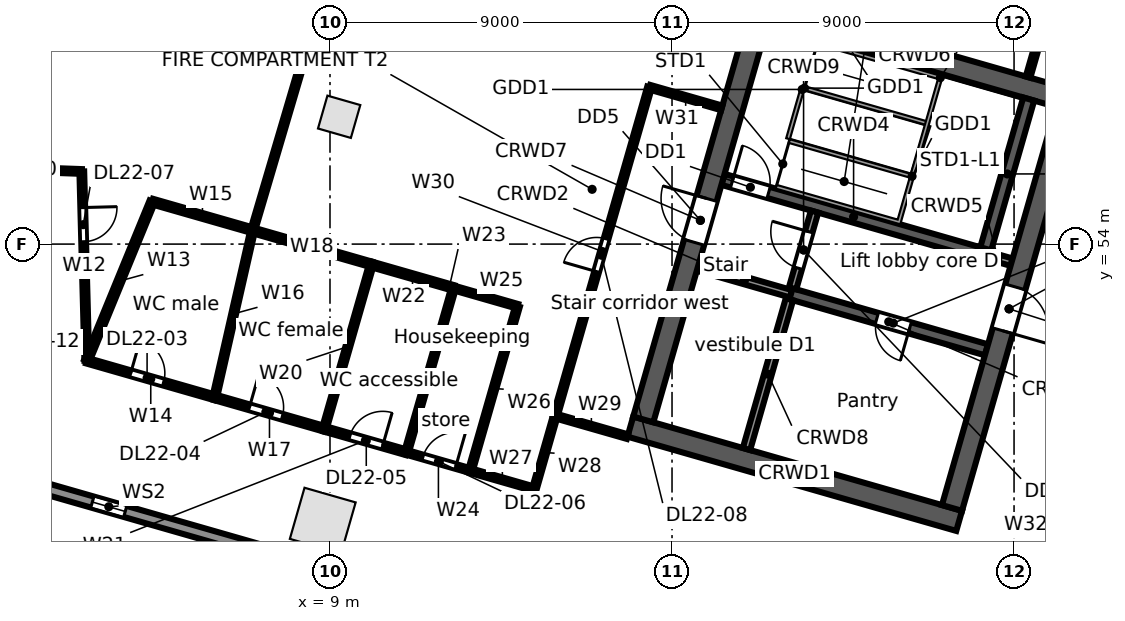
"""IFC4 building model, lengths in metres.
Left out: names, types, materials, properties, quantities, classifications, styles, units other than length and angle.
Written with IfcOpenShell. Run it as: python <this file> out.ifc"""

import sys

from ifc_helpers import new_model, si_unit, direction, frame, frame_2d, origin, origin_2d, place, context, subcontext, project, spatial, rectangle, extrude, element, fill, save


model = new_model("IFC4")
c1 = context("Model", 3, precision=1e-05, world=origin(), true_north=direction((0.0, 1.0)))
c2 = subcontext(c1, "Body", "Model", "MODEL_VIEW")
j1 = project(units=[si_unit("LENGTHUNIT", "METRE"), si_unit("PLANEANGLEUNIT", "RADIAN")], contexts=[c1])
p1 = place(None, origin())
s1 = spatial("IfcSite", under=j1, at=p1, CompositionType="ELEMENT")
p2 = place(p1, origin())
s2 = spatial("IfcBuilding", under=s1, at=p2, CompositionType="ELEMENT")
p3 = place(p2, frame((0.0, 0.0, 110.3)))
s3 = spatial("IfcBuildingStorey", under=s2, at=p3, CompositionType="ELEMENT", Elevation=110.3)
p4 = place(p3, frame((8.81, 46.722, 0.0), z_axis=(0.0, 0.0, 1.0), x_axis=(0.961261695938, -0.275637355817, 0.0)))
e1 = element("IfcColumn", 1, at=p4, inside=s3, PredefinedType="COLUMN", context=c2, shape_type="SweptSolid", body=[
    extrude(rectangle(XDim=1.4, YDim=1.4, at=origin_2d()), origin(), (0.0, 0.0, 1.0), 4.4),
])
p5 = place(p3, frame((9.241, 57.35, 0.0), z_axis=(0.0, 0.0, 1.0), x_axis=(0.961261695938, -0.275637355817, 0.0)))
e2 = element("IfcColumn", 2, at=p5, inside=s3, PredefinedType="COLUMN", context=c2, shape_type="SweptSolid", body=[
    extrude(rectangle(XDim=0.9, YDim=0.9, at=origin_2d()), origin(), (0.0, 0.0, 1.0), 4.4),
])
p6 = place(p3, frame((25.398, 40.717, 0.0), z_axis=(0.0, 0.0, 1.0), x_axis=(-0.961262423262, 0.275634819324, 0.0)))
e3 = element("IfcWall", 3, at=p6, inside=s3, PredefinedType="STANDARD", context=c2, shape_type="SweptSolid", body=[
    extrude(rectangle(XDim=26.359, YDim=0.3, at=frame_2d((13.179, 0.0))), origin(), (0.0, 0.0, 1.0), 4.08),
])
p7 = place(p6, frame((22.664, 0.0, 0.6)))
e4 = element("IfcOpeningElement", 4, at=p7, cuts=e3, PredefinedType="OPENING", context=c2, shape_type="SweptSolid", body=[
    extrude(rectangle(XDim=0.9, YDim=2.8, at=frame_2d((0.45, 1.4))), frame((0.0, 0.16, 0.0), z_axis=(0.0, -1.0, 0.0), x_axis=(1.0, 0.0, 0.0)), (0.0, 0.0, 1.0), 0.32),
])
p8 = place(p6, frame((13.844, 0.0, 0.6)))
e5 = element("IfcOpeningElement", 5, at=p8, cuts=e3, PredefinedType="OPENING", context=c2, shape_type="SweptSolid", body=[
    extrude(rectangle(XDim=0.9, YDim=2.8, at=frame_2d((0.45, 1.4))), frame((0.0, 0.16, 0.0), z_axis=(0.0, -1.0, 0.0), x_axis=(1.0, 0.0, 0.0)), (0.0, 0.0, 1.0), 0.32),
])
p9 = place(p6, frame((5.023, 0.0, 0.6)))
e6 = element("IfcOpeningElement", 6, at=p9, cuts=e3, PredefinedType="OPENING", context=c2, shape_type="SweptSolid", body=[
    extrude(rectangle(XDim=0.9, YDim=2.8, at=frame_2d((0.45, 1.4))), frame((0.0, 0.16, 0.0), z_axis=(0.0, -1.0, 0.0), x_axis=(1.0, 0.0, 0.0)), (0.0, 0.0, 1.0), 0.32),
])
p10 = place(p3, frame((16.904, 49.197, 0.0), z_axis=(0.0, 0.0, 1.0), x_axis=(0.96126248289, -0.275634611374, 0.0)))
e7 = element("IfcWall", 7, at=p10, inside=s3, PredefinedType="SOLIDWALL", context=c2, shape_type="SweptSolid", body=[
    extrude(rectangle(XDim=9.0, YDim=0.55, at=frame_2d((4.5, 0.0))), origin(), (0.0, 0.0, 1.0), 4.08),
])
p11 = place(p3, frame((18.68, 53.396, 0.0), z_axis=(0.0, 0.0, 1.0), x_axis=(0.961234387647, -0.275732573349, 0.0)))
e8 = element("IfcWall", 8, at=p11, inside=s3, PredefinedType="SOLIDWALL", context=c2, shape_type="SweptSolid", body=[
    extrude(rectangle(XDim=2.55, YDim=0.2, at=frame_2d((1.275, 0.0))), origin(), (0.0, 0.0, 1.0), 4.08),
])
p12 = place(p3, frame((21.131, 52.692, 0.0), z_axis=(0.0, 0.0, 1.0), x_axis=(0.961265220997, -0.27562506218, 0.0)))
e9 = element("IfcWall", 9, at=p12, inside=s3, PredefinedType="SOLIDWALL", context=c2, shape_type="SweptSolid", body=[
    extrude(rectangle(XDim=5.35, YDim=0.3, at=frame_2d((2.675, 0.0))), origin(), (0.0, 0.0, 1.0), 4.08),
])
p13 = place(p12, frame((2.35, 0.0, 0.0)))
e10 = element("IfcOpeningElement", 10, at=p13, cuts=e9, PredefinedType="OPENING", context=c2, shape_type="SweptSolid", body=[
    extrude(rectangle(XDim=0.9, YDim=2.1, at=frame_2d((0.45, 1.05))), frame((0.0, 0.16, 0.0), z_axis=(0.0, -1.0, 0.0), x_axis=(1.0, 0.0, 0.0)), (0.0, 0.0, 1.0), 0.32),
])
p14 = place(p3, frame((19.341, 55.702, 0.0), z_axis=(0.0, 0.0, 1.0), x_axis=(0.961263228157, -0.27563201228, 0.0)))
e11 = element("IfcWall", 11, at=p14, inside=s3, PredefinedType="SOLIDWALL", context=c2, shape_type="SweptSolid", body=[
    extrude(rectangle(XDim=7.15, YDim=0.3, at=frame_2d((3.575, 0.0))), origin(), (0.0, 0.0, 1.0), 4.08),
])
p15 = place(p14, frame((0.25, 0.0, 0.0)))
e12 = element("IfcOpeningElement", 12, at=p15, cuts=e11, PredefinedType="OPENING", context=c2, shape_type="SweptSolid", body=[
    extrude(rectangle(XDim=1.0, YDim=2.1, at=frame_2d((0.5, 1.05))), frame((0.0, 0.16, 0.0), z_axis=(0.0, -1.0, 0.0), x_axis=(1.0, 0.0, 0.0)), (0.0, 0.0, 1.0), 0.32),
])
p16 = place(p3, frame((26.214, 53.732, 0.0), z_axis=(0.0, 0.0, 1.0), x_axis=(0.961240918172, -0.275709806194, 0.0)))
e13 = element("IfcWall", 13, at=p16, inside=s3, PredefinedType="SOLIDWALL", context=c2, shape_type="SweptSolid", body=[
    extrude(rectangle(XDim=0.75, YDim=0.2, at=frame_2d((0.375, 0.0))), origin(), (0.0, 0.0, 1.0), 4.08),
])
p17 = place(p3, frame((20.06, 60.204, 0.0), z_axis=(0.0, 0.0, 1.0), x_axis=(0.96126248289, -0.275634611374, 0.0)))
e14 = element("IfcWall", 14, at=p17, inside=s3, PredefinedType="SOLIDWALL", context=c2, shape_type="SweptSolid", body=[
    extrude(rectangle(XDim=9.0, YDim=0.55, at=frame_2d((4.5, 0.0))), origin(), (0.0, 0.0, 1.0), 4.08),
])
p18 = place(p3, frame((17.244, 49.386, 0.0), z_axis=(0.0, 0.0, 1.0), x_axis=(0.275632146085, 0.96126318979, 0.0)))
e15 = element("IfcWall", 15, at=p18, inside=s3, PredefinedType="SOLIDWALL", context=c2, shape_type="SweptSolid", body=[
    extrude(rectangle(XDim=10.9, YDim=0.55, at=frame_2d((5.45, 0.0))), origin(), (0.0, 0.0, 1.0), 4.08),
])
p19 = place(p18, frame((4.85, 0.0, 0.0)))
e16 = element("IfcOpeningElement", 16, at=p19, cuts=e15, PredefinedType="OPENING", context=c2, shape_type="SweptSolid", body=[
    extrude(rectangle(XDim=1.2, YDim=2.1, at=frame_2d((0.6, 1.05))), frame((0.0, 0.285, 0.0), z_axis=(0.0, -1.0, 0.0), x_axis=(1.0, 0.0, 0.0)), (0.0, 0.0, 1.0), 0.57),
])
p20 = place(p3, frame((19.959, 48.607, 0.0), z_axis=(0.0, 0.0, 1.0), x_axis=(0.275641165445, 0.961260603537, 0.0)))
e17 = element("IfcWall", 17, at=p20, inside=s3, PredefinedType="SOLIDWALL", context=c2, shape_type="SweptSolid", body=[
    extrude(rectangle(XDim=4.1, YDim=0.2, at=frame_2d((2.05, 0.0))), origin(), (0.0, 0.0, 1.0), 4.08),
])
p21 = place(p3, frame((21.172, 52.837, 0.0), z_axis=(0.0, 0.0, 1.0), x_axis=(0.275657676022, 0.961255868981, 0.0)))
e18 = element("IfcWall", 18, at=p21, inside=s3, PredefinedType="PARTITIONING", context=c2, shape_type="SweptSolid", body=[
    extrude(rectangle(XDim=2.1, YDim=0.2, at=frame_2d((1.05, 0.0))), origin(), (0.0, 0.0, 1.0), 4.08),
])
p22 = place(p21, frame((0.55, 0.0, 0.0)))
e19 = element("IfcOpeningElement", 19, at=p22, cuts=e18, PredefinedType="OPENING", context=c2, shape_type="SweptSolid", body=[
    extrude(rectangle(XDim=1.0, YDim=2.1, at=frame_2d((0.5, 1.05))), frame((0.0, 0.11, 0.0), z_axis=(0.0, -1.0, 0.0), x_axis=(1.0, 0.0, 0.0)), (0.0, 0.0, 1.0), 0.22),
])
p23 = place(p3, frame((26.256, 53.876, 0.0), z_axis=(0.0, 0.0, 1.0), x_axis=(0.275641165445, 0.961260603537, 0.0)))
e20 = element("IfcWall", 20, at=p23, inside=s3, PredefinedType="SOLIDWALL", context=c2, shape_type="SweptSolid", body=[
    extrude(rectangle(XDim=4.1, YDim=0.3, at=frame_2d((2.05, 0.0))), origin(), (0.0, 0.0, 1.0), 4.08),
])
p24 = place(p3, frame((25.366, 47.057, 0.0), z_axis=(0.0, 0.0, 1.0), x_axis=(0.275632146085, 0.96126318979, 0.0)))
e21 = element("IfcWall", 21, at=p24, inside=s3, PredefinedType="SOLIDWALL", context=c2, shape_type="SweptSolid", body=[
    extrude(rectangle(XDim=10.9, YDim=0.55, at=frame_2d((5.45, 0.0))), origin(), (0.0, 0.0, 1.0), 4.08),
])
p25 = place(p24, frame((4.85, 0.0, 0.0)))
e22 = element("IfcOpeningElement", 22, at=p25, cuts=e21, PredefinedType="OPENING", context=c2, shape_type="SweptSolid", body=[
    extrude(rectangle(XDim=1.2, YDim=2.1, at=frame_2d((0.6, 1.05))), frame((0.0, 0.285, 0.0), z_axis=(0.0, -1.0, 0.0), x_axis=(1.0, 0.0, 0.0)), (0.0, 0.0, 1.0), 0.57),
])
p26 = place(p3, frame((0.0, 56.0, 0.0), z_axis=(0.0, 0.0, 1.0), x_axis=(0.999349313684, -0.036068673934, 0.0)))
e23 = element("IfcWall", 23, at=p26, inside=s3, PredefinedType="PARTITIONING", context=c2, shape_type="SweptSolid", body=[
    extrude(rectangle(XDim=2.471, YDim=0.125, at=frame_2d((1.235, 0.0))), origin(), (0.0, 0.0, 1.0), 4.08),
])
p27 = place(p3, frame((2.469, 55.911, 0.0), z_axis=(0.0, 0.0, 1.0), x_axis=(0.02651808123, -0.999648333849, 0.0)))
e24 = element("IfcWall", 24, at=p27, inside=s3, PredefinedType="PARTITIONING", context=c2, shape_type="SweptSolid", body=[
    extrude(rectangle(XDim=4.981, YDim=0.125, at=frame_2d((2.49, 0.0))), origin(), (0.0, 0.0, 1.0), 4.08),
])
p28 = place(p27, frame((0.95, 0.0, 0.0)))
e25 = element("IfcOpeningElement", 25, at=p28, cuts=e24, PredefinedType="OPENING", context=c2, shape_type="SweptSolid", body=[
    extrude(rectangle(XDim=0.9, YDim=2.1, at=frame_2d((0.45, 1.05))), frame((0.0, 0.073, 0.0), z_axis=(0.0, -1.0, 0.0), x_axis=(1.0, 0.0, 0.0)), (0.0, 0.0, 1.0), 0.145),
])
p29 = place(p3, frame((2.601, 50.932, 0.0), z_axis=(0.0, 0.0, 1.0), x_axis=(0.380066317543, 0.924959239247, 0.0)))
e26 = element("IfcWall", 26, at=p29, inside=s3, PredefinedType="PARTITIONING", context=c2, shape_type="SweptSolid", body=[
    extrude(rectangle(XDim=4.528, YDim=0.15, at=frame_2d((2.264, 0.0))), origin(), (0.0, 0.0, 1.0), 4.08),
])
p30 = place(p3, frame((2.601, 50.932, 0.0), z_axis=(0.0, 0.0, 1.0), x_axis=(0.961265606965, -0.27562371608, 0.0)))
e27 = element("IfcWall", 27, at=p30, inside=s3, PredefinedType="PARTITIONING", context=c2, shape_type="SweptSolid", body=[
    extrude(rectangle(XDim=3.5, YDim=0.15, at=frame_2d((1.75, 0.0))), origin(), (0.0, 0.0, 1.0), 4.08),
])
p31 = place(p30, frame((1.2, 0.0, 0.0)))
e28 = element("IfcOpeningElement", 28, at=p31, cuts=e27, PredefinedType="OPENING", context=c2, shape_type="SweptSolid", body=[
    extrude(rectangle(XDim=0.9, YDim=2.1, at=frame_2d((0.45, 1.05))), frame((0.0, 0.085, 0.0), z_axis=(0.0, -1.0, 0.0), x_axis=(1.0, 0.0, 0.0)), (0.0, 0.0, 1.0), 0.17),
])
p32 = place(p3, frame((4.322, 55.12, 0.0), z_axis=(0.0, 0.0, 1.0), x_axis=(0.961272337704, -0.275600240865, 0.0)))
e29 = element("IfcWall", 29, at=p32, inside=s3, PredefinedType="PARTITIONING", context=c2, shape_type="SweptSolid", body=[
    extrude(rectangle(XDim=2.75, YDim=0.15, at=frame_2d((1.375, 0.0))), origin(), (0.0, 0.0, 1.0), 4.08),
])
p33 = place(p3, frame((5.966, 49.967, 0.0), z_axis=(0.0, 0.0, 1.0), x_axis=(0.221859891223, 0.975078555126, 0.0)))
e30 = element("IfcWall", 30, at=p33, inside=s3, PredefinedType="PARTITIONING", context=c2, shape_type="SweptSolid", body=[
    extrude(rectangle(XDim=4.507, YDim=0.125, at=frame_2d((2.254, 0.0))), origin(), (0.0, 0.0, 1.0), 4.08),
])
p34 = place(p3, frame((5.966, 49.967, 0.0), z_axis=(0.0, 0.0, 1.0), x_axis=(0.961222353496, -0.275774522283, 0.0)))
e31 = element("IfcWall", 31, at=p34, inside=s3, PredefinedType="PARTITIONING", context=c2, shape_type="SweptSolid", body=[
    extrude(rectangle(XDim=2.999, YDim=0.15, at=frame_2d((1.5, 0.0))), origin(), (0.0, 0.0, 1.0), 3.16),
])
p35 = place(p34, frame((0.95, 0.0, 0.0)))
e32 = element("IfcOpeningElement", 32, at=p35, cuts=e31, PredefinedType="OPENING", context=c2, shape_type="SweptSolid", body=[
    extrude(rectangle(XDim=0.9, YDim=2.1, at=frame_2d((0.45, 1.05))), frame((0.0, 0.085, 0.0), z_axis=(0.0, -1.0, 0.0), x_axis=(1.0, 0.0, 0.0)), (0.0, 0.0, 1.0), 0.17),
])
p36 = place(p3, frame((6.966, 54.362, 0.0), z_axis=(0.0, 0.0, 1.0), x_axis=(0.961245650832, -0.275693305607, 0.0)))
e33 = element("IfcWall", 33, at=p36, inside=s3, PredefinedType="PARTITIONING", context=c2, shape_type="SweptSolid", body=[
    extrude(rectangle(XDim=3.25, YDim=0.15, at=frame_2d((1.625, 0.0))), origin(), (0.0, 0.0, 1.0), 3.16),
])
p37 = place(p3, frame((6.966, 54.362, 0.0), z_axis=(0.0, 0.0, 1.0), x_axis=(0.283059793108, 0.959102264373, 0.0)))
e34 = element("IfcWall", 34, at=p37, inside=s3, PredefinedType="PARTITIONING", context=c2, shape_type="SweptSolid", body=[
    extrude(rectangle(XDim=13.135, YDim=0.125, at=frame_2d((6.567, 0.0))), origin(), (0.0, 0.0, 1.0), 3.142),
])
p38 = place(p3, frame((8.849, 49.14, 0.0), z_axis=(0.0, 0.0, 1.0), x_axis=(0.275731175537, 0.961234788612, 0.0)))
e35 = element("IfcWall", 35, at=p38, inside=s3, PredefinedType="PARTITIONING", context=c2, shape_type="SweptSolid", body=[
    extrude(rectangle(XDim=4.501, YDim=0.125, at=frame_2d((2.25, 0.0))), origin(), (0.0, 0.0, 1.0), 3.16),
])
p39 = place(p3, frame((8.849, 49.14, 0.0), z_axis=(0.0, 0.0, 1.0), x_axis=(0.961298413165, -0.275509275429, 0.0)))
e36 = element("IfcWall", 36, at=p39, inside=s3, PredefinedType="PARTITIONING", context=c2, shape_type="SweptSolid", body=[
    extrude(rectangle(XDim=2.25, YDim=0.15, at=frame_2d((1.125, 0.0))), origin(), (0.0, 0.0, 1.0), 3.142),
])
p40 = place(p39, frame((0.7, 0.0, 0.0)))
e37 = element("IfcOpeningElement", 37, at=p40, cuts=e36, PredefinedType="OPENING", context=c2, shape_type="SweptSolid", body=[
    extrude(rectangle(XDim=0.9, YDim=2.1, at=frame_2d((0.45, 1.05))), frame((0.0, 0.085, 0.0), z_axis=(0.0, -1.0, 0.0), x_axis=(1.0, 0.0, 0.0)), (0.0, 0.0, 1.0), 0.17),
])
p41 = place(p3, frame((10.09, 53.466, 0.0), z_axis=(0.0, 0.0, 1.0), x_axis=(0.961269670038, -0.275609545309, 0.0)))
e38 = element("IfcWall", 38, at=p41, inside=s3, PredefinedType="PARTITIONING", context=c2, shape_type="SweptSolid", body=[
    extrude(rectangle(XDim=2.25, YDim=0.15, at=frame_2d((1.125, 0.0))), origin(), (0.0, 0.0, 1.0), 3.142),
])
p42 = place(p3, frame((11.012, 48.52, 0.0), z_axis=(0.0, 0.0, 1.0), x_axis=(0.275745553681, 0.96123066411, 0.0)))
e39 = element("IfcWall", 39, at=p42, inside=s3, PredefinedType="PARTITIONING", context=c2, shape_type="SweptSolid", body=[
    extrude(rectangle(XDim=4.5, YDim=0.125, at=frame_2d((2.25, 0.0))), origin(), (0.0, 0.0, 1.0), 4.08),
])
p43 = place(p3, frame((11.012, 48.52, 0.0), z_axis=(0.0, 0.0, 1.0), x_axis=(0.961323619822, -0.275421309946, 0.0)))
e40 = element("IfcWall", 40, at=p43, inside=s3, PredefinedType="PARTITIONING", context=c2, shape_type="SweptSolid", body=[
    extrude(rectangle(XDim=1.75, YDim=0.125, at=frame_2d((0.875, 0.0))), origin(), (0.0, 0.0, 1.0), 4.08),
])
p44 = place(p43, frame((0.45, 0.0, 0.0)))
e41 = element("IfcOpeningElement", 41, at=p44, cuts=e40, PredefinedType="OPENING", context=c2, shape_type="SweptSolid", body=[
    extrude(rectangle(XDim=0.9, YDim=2.1, at=frame_2d((0.45, 1.05))), frame((0.0, 0.073, 0.0), z_axis=(0.0, -1.0, 0.0), x_axis=(1.0, 0.0, 0.0)), (0.0, 0.0, 1.0), 0.145),
])
p45 = place(p3, frame((12.253, 52.846, 0.0), z_axis=(0.0, 0.0, 1.0), x_axis=(0.961175737212, -0.275936953296, 0.0)))
e42 = element("IfcWall", 42, at=p45, inside=s3, PredefinedType="PARTITIONING", context=c2, shape_type="SweptSolid", body=[
    extrude(rectangle(XDim=1.75, YDim=0.125, at=frame_2d((0.875, 0.0))), origin(), (0.0, 0.0, 1.0), 4.08),
])
p46 = place(p3, frame((12.694, 48.038, 0.0), z_axis=(0.0, 0.0, 1.0), x_axis=(0.275803080638, 0.96121415965, 0.0)))
e43 = element("IfcWall", 43, at=p46, inside=s3, PredefinedType="PARTITIONING", context=c2, shape_type="SweptSolid", body=[
    extrude(rectangle(XDim=4.5, YDim=0.125, at=frame_2d((2.25, 0.0))), origin(), (0.0, 0.0, 1.0), 4.08),
])
p47 = place(p3, frame((12.694, 48.038, 0.0), z_axis=(0.0, 0.0, 1.0), x_axis=(0.961170605556, -0.275954827854, 0.0)))
e44 = element("IfcWall", 44, at=p47, inside=s3, PredefinedType="PARTITIONING", context=c2, shape_type="SweptSolid", body=[
    extrude(rectangle(XDim=1.751, YDim=0.125, at=frame_2d((0.875, 0.0))), origin(), (0.0, 0.0, 1.0), 4.08),
])
p48 = place(p3, frame((14.377, 47.555, 0.0), z_axis=(0.0, 0.0, 1.0), x_axis=(0.275446387355, 0.961316434736, 0.0)))
e45 = element("IfcWall", 45, at=p48, inside=s3, PredefinedType="PARTITIONING", context=c2, shape_type="SweptSolid", body=[
    extrude(rectangle(XDim=2.0, YDim=0.125, at=frame_2d((1.0, 0.0))), origin(), (0.0, 0.0, 1.0), 4.08),
])
p49 = place(p3, frame((14.928, 49.478, 0.0), z_axis=(0.0, 0.0, 1.0), x_axis=(0.961243778232, -0.27569983462, 0.0)))
e46 = element("IfcWall", 46, at=p49, inside=s3, PredefinedType="PARTITIONING", context=c2, shape_type="SweptSolid", body=[
    extrude(rectangle(XDim=1.977, YDim=0.125, at=frame_2d((0.988, 0.0))), origin(), (0.0, 0.0, 1.0), 4.08),
])
p50 = place(p3, frame((14.928, 49.478, 0.0), z_axis=(0.0, 0.0, 1.0), x_axis=(0.275674053528, 0.961251172281, 0.0)))
e47 = element("IfcWall", 47, at=p50, inside=s3, PredefinedType="PARTITIONING", context=c2, shape_type="SweptSolid", body=[
    extrude(rectangle(XDim=9.0, YDim=0.125, at=frame_2d((4.5, 0.0))), origin(), (0.0, 0.0, 1.0), 3.142),
])
p51 = place(p50, frame((3.95, 0.0, 0.0)))
e48 = element("IfcOpeningElement", 48, at=p51, cuts=e47, PredefinedType="OPENING", context=c2, shape_type="SweptSolid", body=[
    extrude(rectangle(XDim=0.9, YDim=2.1, at=frame_2d((0.45, 1.05))), frame((0.0, 0.073, 0.0), z_axis=(0.0, -1.0, 0.0), x_axis=(1.0, 0.0, 0.0)), (0.0, 0.0, 1.0), 0.145),
])
p52 = place(p3, frame((17.409, 58.129, 0.0), z_axis=(0.0, 0.0, 1.0), x_axis=(0.961253165474, -0.275667103345, 0.0)))
e49 = element("IfcWall", 49, at=p52, inside=s3, PredefinedType="PARTITIONING", context=c2, shape_type="SweptSolid", body=[
    extrude(rectangle(XDim=1.977, YDim=0.125, at=frame_2d((0.988, 0.0))), origin(), (0.0, 0.0, 1.0), 4.08),
])
p53 = place(p3, frame((26.373, 42.206, 0.0), z_axis=(0.0, 0.0, 1.0), x_axis=(0.52987567935, 0.848075329457, 0.0)))
e50 = element("IfcWall", 50, at=p53, inside=s3, PredefinedType="PARTITIONING", context=c2, shape_type="SweptSolid", body=[
    extrude(rectangle(XDim=6.232, YDim=0.25, at=frame_2d((3.116, 0.0))), origin(), (0.0, 0.0, 1.0), 4.08),
])
p54 = place(p53, frame((2.2, 0.0, 0.0)))
e51 = element("IfcOpeningElement", 51, at=p54, cuts=e50, PredefinedType="OPENING", context=c2, shape_type="SweptSolid", body=[
    extrude(rectangle(XDim=1.8, YDim=2.1, at=frame_2d((0.9, 1.05))), frame((0.0, 0.135, 0.0), z_axis=(0.0, -1.0, 0.0), x_axis=(1.0, 0.0, 0.0)), (0.0, 0.0, 1.0), 0.27),
])
p55 = place(p3, frame((27.368, 58.394, 0.0), z_axis=(0.0, 0.0, 1.0), x_axis=(0.276295387056, 0.961072764722, 0.0)))
e52 = element("IfcWall", 52, at=p55, inside=s3, PredefinedType="PARTITIONING", context=c2, shape_type="SweptSolid", body=[
    extrude(rectangle(XDim=5.386, YDim=0.125, at=frame_2d((2.693, 0.0))), origin(), (0.0, 0.0, 1.0), 3.142),
])
p56 = place(p7, origin())
e53 = element("IfcWindow", 53, at=p56, inside=s3, PartitioningType="SINGLE_PANEL", PredefinedType="WINDOW", context=c2, shape_type="SweptSolid", body=[
    extrude(rectangle(XDim=0.9, YDim=2.8, at=frame_2d((0.45, 1.4))), frame((0.0, 0.03, 0.0), z_axis=(0.0, -1.0, 0.0), x_axis=(1.0, 0.0, 0.0)), (0.0, 0.0, 1.0), 0.06),
])
fill(e4, e53)
p57 = place(p15, origin())
e54 = element("IfcDoor", 54, at=p57, inside=s3, OperationType="SINGLE_SWING_LEFT", PredefinedType="DOOR", context=c2, shape_type="SweptSolid", body=[
    extrude(rectangle(XDim=1.0, YDim=2.1, at=frame_2d((0.5, 1.05))), frame((0.0, 0.025, 0.0), z_axis=(0.0, -1.0, 0.0), x_axis=(1.0, 0.0, 0.0)), (0.0, 0.0, 1.0), 0.05),
])
fill(e12, e54)
p58 = place(p22, origin())
e55 = element("IfcDoor", 55, at=p58, inside=s3, OperationType="SINGLE_SWING_RIGHT", PredefinedType="DOOR", context=c2, shape_type="SweptSolid", body=[
    extrude(rectangle(XDim=1.0, YDim=2.1, at=frame_2d((0.5, 1.05))), frame((0.0, 0.025, 0.0), z_axis=(0.0, -1.0, 0.0), x_axis=(1.0, 0.0, 0.0)), (0.0, 0.0, 1.0), 0.05),
])
fill(e19, e55)
p59 = place(p19, origin())
e56 = element("IfcDoor", 56, at=p59, inside=s3, OperationType="SINGLE_SWING_RIGHT", PredefinedType="DOOR", context=c2, shape_type="SweptSolid", body=[
    extrude(rectangle(XDim=1.2, YDim=2.1, at=frame_2d((0.6, 1.05))), frame((0.0, 0.025, 0.0), z_axis=(0.0, -1.0, 0.0), x_axis=(1.0, 0.0, 0.0)), (0.0, 0.0, 1.0), 0.05),
])
fill(e16, e56)
p60 = place(p25, frame((1.2, 0.0, 0.0), z_axis=(0.0, 0.0, 1.0), x_axis=(-1.0, 0.0, 0.0)))
e57 = element("IfcDoor", 57, at=p60, inside=s3, OperationType="SINGLE_SWING_RIGHT", PredefinedType="DOOR", context=c2, shape_type="SweptSolid", body=[
    extrude(rectangle(XDim=1.2, YDim=2.1, at=frame_2d((0.6, 1.05))), frame((0.0, 0.025, 0.0), z_axis=(0.0, -1.0, 0.0), x_axis=(1.0, 0.0, 0.0)), (0.0, 0.0, 1.0), 0.05),
])
fill(e22, e57)
p61 = place(p13, frame((0.9, 0.0, 0.0), z_axis=(0.0, 0.0, 1.0), x_axis=(-1.0, 0.0, 0.0)))
e58 = element("IfcDoor", 58, at=p61, inside=s3, OperationType="SINGLE_SWING_LEFT", PredefinedType="DOOR", context=c2, shape_type="SweptSolid", body=[
    extrude(rectangle(XDim=0.9, YDim=2.1, at=frame_2d((0.45, 1.05))), frame((0.0, 0.025, 0.0), z_axis=(0.0, -1.0, 0.0), x_axis=(1.0, 0.0, 0.0)), (0.0, 0.0, 1.0), 0.05),
])
fill(e10, e58)
p62 = place(p31, origin())
e59 = element("IfcDoor", 59, at=p62, inside=s3, OperationType="SINGLE_SWING_LEFT", PredefinedType="DOOR", context=c2, shape_type="SweptSolid", body=[
    extrude(rectangle(XDim=0.9, YDim=2.1, at=frame_2d((0.45, 1.05))), frame((0.0, 0.025, 0.0), z_axis=(0.0, -1.0, 0.0), x_axis=(1.0, 0.0, 0.0)), (0.0, 0.0, 1.0), 0.05),
])
fill(e28, e59)
p63 = place(p35, origin())
e60 = element("IfcDoor", 60, at=p63, inside=s3, OperationType="SINGLE_SWING_LEFT", PredefinedType="DOOR", context=c2, shape_type="SweptSolid", body=[
    extrude(rectangle(XDim=0.9, YDim=2.1, at=frame_2d((0.45, 1.05))), frame((0.0, 0.025, 0.0), z_axis=(0.0, -1.0, 0.0), x_axis=(1.0, 0.0, 0.0)), (0.0, 0.0, 1.0), 0.05),
])
fill(e32, e60)
p64 = place(p40, origin())
e61 = element("IfcDoor", 61, at=p64, inside=s3, OperationType="SINGLE_SWING_RIGHT", PredefinedType="DOOR", context=c2, shape_type="SweptSolid", body=[
    extrude(rectangle(XDim=0.9, YDim=2.1, at=frame_2d((0.45, 1.05))), frame((0.0, 0.025, 0.0), z_axis=(0.0, -1.0, 0.0), x_axis=(1.0, 0.0, 0.0)), (0.0, 0.0, 1.0), 0.05),
])
fill(e37, e61)
p65 = place(p44, origin())
e62 = element("IfcDoor", 62, at=p65, inside=s3, OperationType="SINGLE_SWING_RIGHT", PredefinedType="DOOR", context=c2, shape_type="SweptSolid", body=[
    extrude(rectangle(XDim=0.9, YDim=2.1, at=frame_2d((0.45, 1.05))), frame((0.0, 0.025, 0.0), z_axis=(0.0, -1.0, 0.0), x_axis=(1.0, 0.0, 0.0)), (0.0, 0.0, 1.0), 0.05),
])
fill(e41, e62)
p66 = place(p28, origin())
e63 = element("IfcDoor", 63, at=p66, inside=s3, OperationType="SINGLE_SWING_LEFT", PredefinedType="DOOR", context=c2, shape_type="SweptSolid", body=[
    extrude(rectangle(XDim=0.9, YDim=2.1, at=frame_2d((0.45, 1.05))), frame((0.0, 0.025, 0.0), z_axis=(0.0, -1.0, 0.0), x_axis=(1.0, 0.0, 0.0)), (0.0, 0.0, 1.0), 0.05),
])
fill(e25, e63)
p67 = place(p51, origin())
e64 = element("IfcDoor", 64, at=p67, inside=s3, OperationType="SINGLE_SWING_LEFT", PredefinedType="DOOR", context=c2, shape_type="SweptSolid", body=[
    extrude(rectangle(XDim=0.9, YDim=2.1, at=frame_2d((0.45, 1.05))), frame((0.0, 0.025, 0.0), z_axis=(0.0, -1.0, 0.0), x_axis=(1.0, 0.0, 0.0)), (0.0, 0.0, 1.0), 0.05),
])
fill(e48, e64)
save(model, sys.argv[1])
